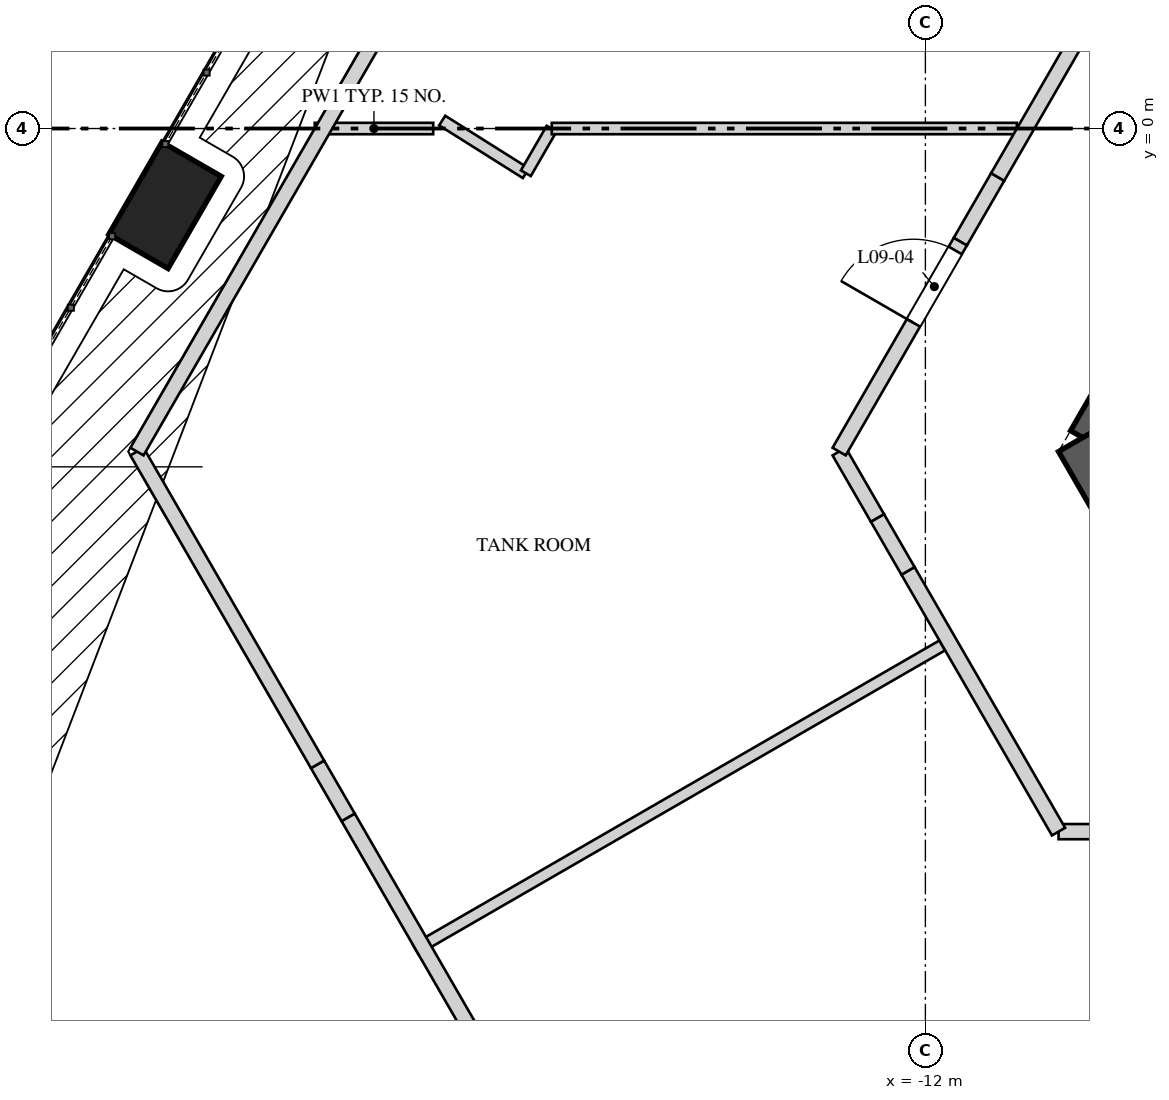
"""IFC4 building model, lengths in metres.
Left out: names, types, materials, properties, quantities, classifications, styles, units other than length and angle.
Written with IfcOpenShell. Run it as: python <this file> out.ifc"""

import sys

from ifc_helpers import new_model, si_unit, direction, frame, frame_2d, origin, origin_2d, place, context, subcontext, project, spatial, rectangle, extrude, element, fill, save


model = new_model("IFC4")
c1 = context("Model", 3, precision=1e-05, world=origin(), true_north=direction((0.0, 1.0)))
c2 = subcontext(c1, "Body", "Model", "MODEL_VIEW")
j1 = project(units=[si_unit("LENGTHUNIT", "METRE"), si_unit("PLANEANGLEUNIT", "RADIAN")], contexts=[c1])
p1 = place(None, origin())
s1 = spatial("IfcSite", under=j1, at=p1, CompositionType="ELEMENT")
p2 = place(p1, origin())
s2 = spatial("IfcBuilding", under=s1, at=p2, CompositionType="ELEMENT")
p3 = place(p2, frame((0.0, 0.0, 46.0)))
s3 = spatial("IfcBuildingStorey", under=s2, at=p3, CompositionType="ELEMENT", Elevation=46.0)
p4 = place(p3, frame((-1.126, 10.45, 0.0), z_axis=(0.0, 0.0, 1.0), x_axis=(-0.500001757713, -0.866024388966, 0.0)))
e1 = element("IfcWall", 1, at=p4, inside=s3, PredefinedType="SHEAR", context=c2, shape_type="SweptSolid", body=[
    extrude(rectangle(XDim=16.974, YDim=1.1, at=frame_2d((8.487, 0.0))), origin(), (0.0, 0.0, 1.0), 5.2),
])
p5 = place(p4, frame((6.692, 0.0, 0.0)))
e2 = element("IfcOpeningElement", 2, at=p5, cuts=e1, PredefinedType="OPENING", context=c2, shape_type="SweptSolid", body=[
    extrude(rectangle(XDim=1.0, YDim=2.4, at=frame_2d((0.5, 1.2))), frame((0.0, 0.56, 0.0), z_axis=(0.0, -1.0, 0.0), x_axis=(1.0, 0.0, 0.0)), (0.0, 0.0, 1.0), 1.12),
])
p6 = place(p3, frame((-9.772, -3.975, 0.0), z_axis=(0.0, 0.0, 1.0), x_axis=(0.499995765644, -0.866027848477, 0.0)))
e3 = element("IfcWall", 3, at=p6, inside=s3, PredefinedType="SHEAR", context=c2, shape_type="SweptSolid", body=[
    extrude(rectangle(XDim=2.887, YDim=1.1, at=frame_2d((1.443, 0.0))), origin(), (0.0, 0.0, 1.0), 5.2),
])
p7 = place(p3, frame((-22.003, -1.011, 0.0), z_axis=(0.0, 0.0, 1.0), x_axis=(-0.5, -0.866025403784, 0.0)))
e4 = element("IfcColumn", 4, at=p7, inside=s3, PredefinedType="COLUMN", context=c2, shape_type="SweptSolid", body=[
    extrude(rectangle(XDim=1.4, YDim=0.9, at=origin_2d()), origin(), (0.0, 0.0, 1.0), 2.898),
])
p8 = place(p3, frame((-18.475, 0.0, 0.0), z_axis=(0.0, 0.0, 1.0), x_axis=(-1.0, 0.0, 0.0)))
e5 = element("IfcWall", 5, at=p8, inside=s3, PredefinedType="PARTITIONING", context=c2, shape_type="SweptSolid", body=[
    extrude(rectangle(XDim=1.559, YDim=0.15, at=frame_2d((0.779, 0.0))), origin(), (0.0, 0.0, 1.0), 4.85),
])
p9 = place(p3, frame((-17.256, -0.588, 0.0), z_axis=(0.0, 0.0, 1.0), x_axis=(-0.846148217584, 0.532947646471, 0.0)))
e6 = element("IfcWall", 6, at=p9, inside=s3, PredefinedType="PARTITIONING", context=c2, shape_type="SweptSolid", body=[
    extrude(rectangle(XDim=1.301, YDim=0.15, at=frame_2d((0.65, 0.0))), origin(), (0.0, 0.0, 1.0), 4.85),
])
p10 = place(p3, frame((-16.917, -0.001, 0.0), z_axis=(0.0, 0.0, 1.0), x_axis=(-0.499971721724, -0.866041729639, 0.0)))
e7 = element("IfcWall", 7, at=p10, inside=s3, PredefinedType="PARTITIONING", context=c2, shape_type="SweptSolid", body=[
    extrude(rectangle(XDim=0.678, YDim=0.15, at=frame_2d((0.339, 0.0))), origin(), (0.0, 0.0, 1.0), 4.85),
])
p11 = place(p3, frame((-11.778, -6.8, 0.0), z_axis=(0.0, 0.0, 1.0), x_axis=(-0.866018381195, -0.500012163284, 0.0)))
e8 = element("IfcWall", 8, at=p11, inside=s3, PredefinedType="PARTITIONING", context=c2, shape_type="SweptSolid", body=[
    extrude(rectangle(XDim=8.0, YDim=0.15, at=frame_2d((4.0, 0.0))), origin(), (0.0, 0.0, 1.0), 4.85),
])
p12 = place(p3, frame((-10.796, 0.0, 0.0), z_axis=(0.0, 0.0, 1.0), x_axis=(-1.0, 0.0, 0.0)))
e9 = element("IfcWall", 9, at=p12, inside=s3, PredefinedType="PARTITIONING", context=c2, shape_type="SweptSolid", body=[
    extrude(rectangle(XDim=6.119, YDim=0.15, at=frame_2d((3.06, 0.0))), origin(), (0.0, 0.0, 1.0), 4.85),
])
p13 = place(p3, frame((-7.215, -9.25, 0.0), z_axis=(0.0, 0.0, 1.0), x_axis=(-1.0, 0.0, 0.0)))
e10 = element("IfcWall", 10, at=p13, inside=s3, PredefinedType="SOLIDWALL", context=c2, shape_type="SweptSolid", body=[
    extrude(rectangle(XDim=3.033, YDim=0.2, at=frame_2d((1.516, 0.0))), origin(), (0.0, 0.0, 1.0), 4.85),
])
p14 = place(p3, frame((-10.248, -9.25, 0.0), z_axis=(0.0, 0.0, 1.0), x_axis=(-0.499983883921, 0.866034708207, 0.0)))
e11 = element("IfcWall", 11, at=p14, inside=s3, PredefinedType="SOLIDWALL", context=c2, shape_type="SweptSolid", body=[
    extrude(rectangle(XDim=3.961, YDim=0.2, at=frame_2d((1.98, 0.0))), origin(), (0.0, 0.0, 1.0), 4.85),
])
p15 = place(p3, frame((-12.229, -5.82, 0.0), z_axis=(0.0, 0.0, 1.0), x_axis=(-0.499923776705, 0.866069406852, 0.0)))
e12 = element("IfcWall", 12, at=p15, inside=s3, PredefinedType="SOLIDWALL", context=c2, shape_type="SweptSolid", body=[
    extrude(rectangle(XDim=0.805, YDim=0.2, at=frame_2d((0.402, 0.0))), origin(), (0.0, 0.0, 1.0), 3.95),
])
p16 = place(p3, frame((-12.631, -5.123, 0.0), z_axis=(0.0, 0.0, 1.0), x_axis=(-0.500099969036, 0.865967678941, 0.0)))
e13 = element("IfcWall", 13, at=p16, inside=s3, PredefinedType="SOLIDWALL", context=c2, shape_type="SweptSolid", body=[
    extrude(rectangle(XDim=1.008, YDim=0.2, at=frame_2d((0.504, 0.0))), origin(), (0.0, 0.0, 1.0), 4.85),
])
p17 = place(p3, frame((-13.135, -4.25, 0.0), z_axis=(0.0, 0.0, 1.0), x_axis=(0.50003154259, 0.866007191896, 0.0)))
e14 = element("IfcWall", 14, at=p17, inside=s3, PredefinedType="SOLIDWALL", context=c2, shape_type="SweptSolid", body=[
    extrude(rectangle(XDim=3.191, YDim=0.2, at=frame_2d((1.595, 0.0))), origin(), (0.0, 0.0, 1.0), 4.85),
])
p18 = place(p17, frame((1.956, 0.0, 0.0)))
e15 = element("IfcOpeningElement", 15, at=p18, cuts=e14, PredefinedType="OPENING", context=c2, shape_type="SweptSolid", body=[
    extrude(rectangle(XDim=1.1, YDim=2.2, at=frame_2d((0.55, 1.1))), frame((0.0, 0.11, 0.0), z_axis=(0.0, -1.0, 0.0), x_axis=(1.0, 0.0, 0.0)), (0.0, 0.0, 1.0), 0.22),
])
p19 = place(p3, frame((-11.539, -1.487, 0.0), z_axis=(0.0, 0.0, 1.0), x_axis=(0.499966601515, 0.86604468555, 0.0)))
e16 = element("IfcWall", 16, at=p19, inside=s3, PredefinedType="SOLIDWALL", context=c2, shape_type="SweptSolid", body=[
    extrude(rectangle(XDim=0.981, YDim=0.2, at=frame_2d((0.49, 0.0))), origin(), (0.0, 0.0, 1.0), 3.95),
])
p20 = place(p3, frame((-11.049, -0.637, 0.0), z_axis=(0.0, 0.0, 1.0), x_axis=(0.500000470374, 0.866025132214, 0.0)))
e17 = element("IfcWall", 17, at=p20, inside=s3, PredefinedType="SOLIDWALL", context=c2, shape_type="SweptSolid", body=[
    extrude(rectangle(XDim=4.257, YDim=0.2, at=frame_2d((2.128, 0.0))), origin(), (0.0, 0.0, 1.0), 4.85),
])
p21 = place(p20, frame((2.827, 0.0, 0.0)))
e18 = element("IfcOpeningElement", 18, at=p21, cuts=e17, PredefinedType="OPENING", context=c2, shape_type="SweptSolid", body=[
    extrude(rectangle(XDim=1.1, YDim=2.2, at=frame_2d((0.55, 1.1))), frame((0.0, 0.11, 0.0), z_axis=(0.0, -1.0, 0.0), x_axis=(1.0, 0.0, 0.0)), (0.0, 0.0, 1.0), 0.22),
])
p22 = place(p3, frame((-14.867, -17.25, 0.0), z_axis=(0.0, 0.0, 1.0), x_axis=(-0.50000482836, 0.866022616111, 0.0)))
e19 = element("IfcWall", 19, at=p22, inside=s3, PredefinedType="SOLIDWALL", context=c2, shape_type="SweptSolid", body=[
    extrude(rectangle(XDim=9.455, YDim=0.2, at=frame_2d((4.728, 0.0))), origin(), (0.0, 0.0, 1.0), 4.85),
])
p23 = place(p22, frame((3.128, 0.0, 0.0)))
e20 = element("IfcOpeningElement", 20, at=p23, cuts=e19, PredefinedType="OPENING", context=c2, shape_type="SweptSolid", body=[
    extrude(rectangle(XDim=1.6, YDim=2.3, at=frame_2d((0.8, 1.15))), frame((0.0, 0.11, 0.0), z_axis=(0.0, -1.0, 0.0), x_axis=(1.0, 0.0, 0.0)), (0.0, 0.0, 1.0), 0.22),
])
p24 = place(p3, frame((-19.594, -9.062, 0.0), z_axis=(0.0, 0.0, 1.0), x_axis=(-0.499923776705, 0.866069406852, 0.0)))
e21 = element("IfcWall", 21, at=p24, inside=s3, PredefinedType="SOLIDWALL", context=c2, shape_type="SweptSolid", body=[
    extrude(rectangle(XDim=0.805, YDim=0.2, at=frame_2d((0.402, 0.0))), origin(), (0.0, 0.0, 1.0), 3.95),
])
p25 = place(p3, frame((-19.997, -8.365, 0.0), z_axis=(0.0, 0.0, 1.0), x_axis=(-0.500013047366, 0.866017870753, 0.0)))
e22 = element("IfcWall", 22, at=p25, inside=s3, PredefinedType="SOLIDWALL", context=c2, shape_type="SweptSolid", body=[
    extrude(rectangle(XDim=4.751, YDim=0.2, at=frame_2d((2.375, 0.0))), origin(), (0.0, 0.0, 1.0), 4.85),
])
p26 = place(p3, frame((-22.372, -4.25, 0.0), z_axis=(0.0, 0.0, 1.0), x_axis=(0.500004108169, 0.866023031919, 0.0)))
e23 = element("IfcWall", 23, at=p26, inside=s3, PredefinedType="SOLIDWALL", context=c2, shape_type="SweptSolid", body=[
    extrude(rectangle(XDim=11.78, YDim=0.2, at=frame_2d((5.89, 0.0))), origin(), (0.0, 0.0, 1.0), 4.85),
])
p27 = place(p18, origin())
e24 = element("IfcDoor", 24, at=p27, inside=s3, OperationType="SINGLE_SWING_RIGHT", PredefinedType="DOOR", context=c2, shape_type="SweptSolid", body=[
    extrude(rectangle(XDim=1.1, YDim=2.2, at=frame_2d((0.55, 1.1))), frame((0.0, 0.025, 0.0), z_axis=(0.0, -1.0, 0.0), x_axis=(1.0, 0.0, 0.0)), (0.0, 0.0, 1.0), 0.05),
])
fill(e15, e24)
save(model, sys.argv[1])
